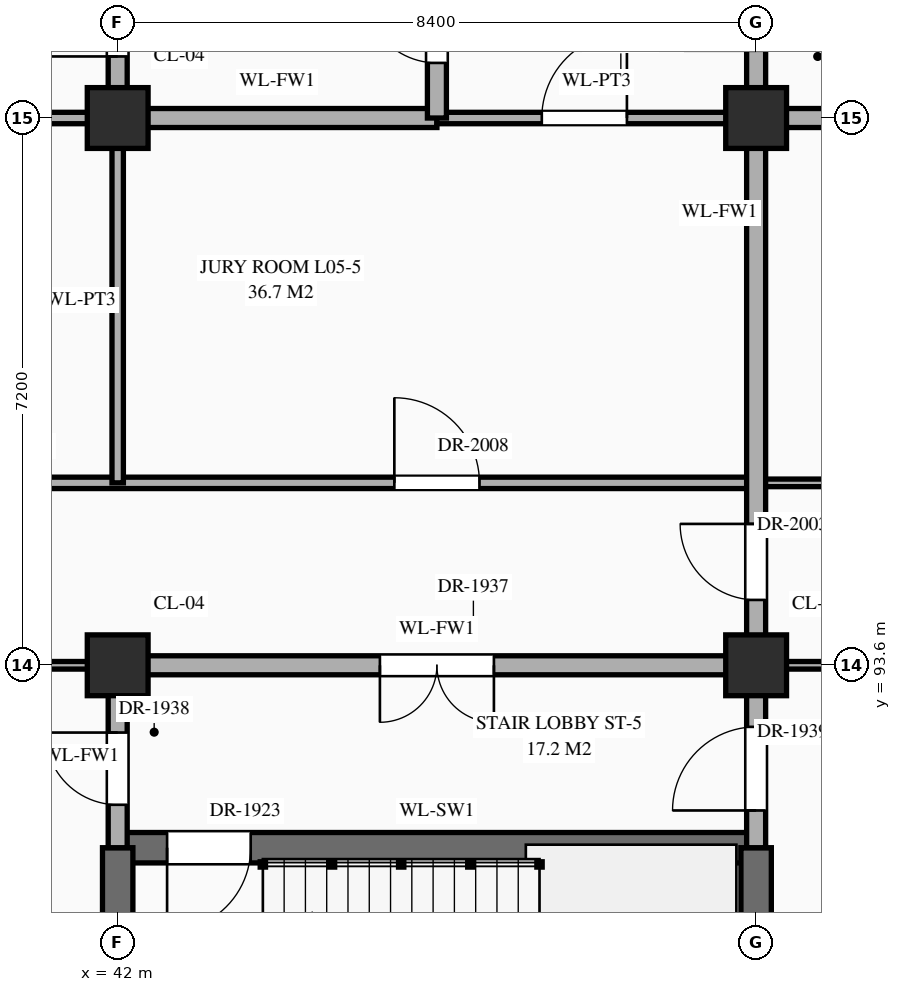
"""IFC4 building model, lengths in metres.
Left out: names, types, materials, properties, quantities, classifications, styles, units other than length and angle.
Written with IfcOpenShell. Run it as: python <this file> out.ifc"""

import sys

from ifc_helpers import new_model, si_unit, direction, frame, frame_2d, origin, origin_2d, place, context, subcontext, project, spatial, rectangle, extrude, element, fill, save


model = new_model("IFC4")
c1 = context("Model", 3, precision=1e-05, world=origin(), true_north=direction((0.0, 1.0)))
c2 = subcontext(c1, "Body", "Model", "MODEL_VIEW")
j1 = project(units=[si_unit("LENGTHUNIT", "METRE"), si_unit("PLANEANGLEUNIT", "RADIAN")], contexts=[c1])
p1 = place(None, origin())
s1 = spatial("IfcSite", under=j1, at=p1, CompositionType="ELEMENT")
p2 = place(p1, origin())
s2 = spatial("IfcBuilding", under=s1, at=p2, CompositionType="ELEMENT")
p3 = place(p2, frame((0.0, 0.0, 21.6)))
s3 = spatial("IfcBuildingStorey", under=s2, at=p3, CompositionType="ELEMENT", Elevation=21.6)
for number, where, z_axis, x_axis in (
    (1, (42.0, 93.6, 0.0), (0.0, 0.0, 1.0), (1.0, 0.0, 0.0)),
    (2, (42.0, 100.8, 0.0), (0.0, 0.0, 1.0), (1.0, 0.0, 0.0)),
    (3, (50.4, 93.6, 0.0), (0.0, 0.0, 1.0), (1.0, 0.0, 0.0)),
    (4, (50.4, 100.8, 0.0), (0.0, 0.0, 1.0), (1.0, 0.0, 0.0)),
):
    element("IfcColumn", number, at=place(p3, frame(where, z_axis=z_axis, x_axis=x_axis)), inside=s3, PredefinedType="COLUMN", context=c2, shape_type="SweptSolid", body=[
        extrude(rectangle(XDim=0.8, YDim=0.8, at=origin_2d()), origin(), (0.0, 0.0, 1.0), 4.5),
    ])
p4 = place(p3, frame((42.0, 91.2, 0.0), z_axis=(0.0, 0.0, 1.0), x_axis=(1.0, 0.0, 0.0)))
e5 = element("IfcWall", 5, at=p4, inside=s3, PredefinedType="SHEAR", context=c2, shape_type="SweptSolid", body=[
    extrude(rectangle(XDim=8.4, YDim=0.4, at=frame_2d((4.2, 0.0))), origin(), (0.0, 0.0, 1.0), 4.24),
])
p5 = place(p4, frame((0.65, 0.0, 0.0)))
e6 = element("IfcOpeningElement", 6, at=p5, cuts=e5, PredefinedType="OPENING", context=c2, shape_type="SweptSolid", body=[
    extrude(rectangle(XDim=1.1, YDim=2.2, at=frame_2d((0.55, 1.1))), frame((0.0, 0.212, 0.0), z_axis=(0.0, -1.0, 0.0), x_axis=(1.0, 0.0, 0.0)), (0.0, 0.0, 1.0), 0.424),
])
p6 = place(p3, frame((25.24, 93.6, 0.0), z_axis=(0.0, 0.0, 1.0), x_axis=(1.0, 0.0, 0.0)))
e7 = element("IfcWall", 7, at=p6, inside=s3, PredefinedType="STANDARD", context=c2, shape_type="SweptSolid", body=[
    extrude(rectangle(XDim=16.76, YDim=0.1, at=frame_2d((8.38, 0.0))), origin(), (0.0, 0.0, 1.0), 3.19),
])
p7 = place(p6, frame((0.94, 0.0, 0.0)))
e8 = element("IfcOpeningElement", 8, at=p7, cuts=e7, PredefinedType="OPENING", context=c2, shape_type="SweptSolid", body=[
    extrude(rectangle(XDim=1.16, YDim=2.3, at=frame_2d((0.58, 1.15))), frame((0.0, 0.062, 0.0), z_axis=(0.0, -1.0, 0.0), x_axis=(1.0, 0.0, 0.0)), (0.0, 0.0, 1.0), 0.124),
])
p8 = place(p6, frame((3.21, 0.0, 0.0)))
e9 = element("IfcOpeningElement", 9, at=p8, cuts=e7, PredefinedType="OPENING", context=c2, shape_type="SweptSolid", body=[
    extrude(rectangle(XDim=1.9, YDim=2.5, at=frame_2d((0.95, 1.25))), frame((0.0, 0.062, 0.0), z_axis=(0.0, -1.0, 0.0), x_axis=(1.0, 0.0, 0.0)), (0.0, 0.0, 1.0), 0.124),
])
p9 = place(p6, frame((6.34, 0.0, 0.0)))
e10 = element("IfcOpeningElement", 10, at=p9, cuts=e7, PredefinedType="OPENING", context=c2, shape_type="SweptSolid", body=[
    extrude(rectangle(XDim=1.24, YDim=2.3, at=frame_2d((0.62, 1.15))), frame((0.0, 0.062, 0.0), z_axis=(0.0, -1.0, 0.0), x_axis=(1.0, 0.0, 0.0)), (0.0, 0.0, 1.0), 0.124),
])
p10 = place(p6, frame((11.76, 0.0, 0.0)))
e11 = element("IfcOpeningElement", 11, at=p10, cuts=e7, PredefinedType="OPENING", context=c2, shape_type="SweptSolid", body=[
    extrude(rectangle(XDim=1.28, YDim=2.35, at=frame_2d((0.64, 1.175))), frame((0.0, 0.062, 0.0), z_axis=(0.0, -1.0, 0.0), x_axis=(1.0, 0.0, 0.0)), (0.0, 0.0, 1.0), 0.124),
])
p11 = place(p3, frame((42.0, 93.6, 0.0), z_axis=(0.0, 0.0, 1.0), x_axis=(1.0, 0.0, 0.0)))
e12 = element("IfcWall", 12, at=p11, inside=s3, PredefinedType="STANDARD", context=c2, shape_type="SweptSolid", body=[
    extrude(rectangle(XDim=8.4, YDim=0.25, at=frame_2d((4.2, 0.0))), origin(), (0.0, 0.0, 1.0), 3.39),
])
p12 = place(p11, frame((3.45, 0.0, 0.0)))
e13 = element("IfcOpeningElement", 13, at=p12, cuts=e12, PredefinedType="OPENING", context=c2, shape_type="SweptSolid", body=[
    extrude(rectangle(XDim=1.5, YDim=2.25, at=frame_2d((0.75, 1.125))), frame((0.0, 0.137, 0.0), z_axis=(0.0, -1.0, 0.0), x_axis=(1.0, 0.0, 0.0)), (0.0, 0.0, 1.0), 0.274),
])
p13 = place(p3, frame((50.4, 93.6, 0.0), z_axis=(0.0, 0.0, 1.0), x_axis=(1.0, 0.0, 0.0)))
e14 = element("IfcWall", 14, at=p13, inside=s3, PredefinedType="STANDARD", context=c2, shape_type="SweptSolid", body=[
    extrude(rectangle(XDim=8.4, YDim=0.1, at=frame_2d((4.2, 0.0))), origin(), (0.0, 0.0, 1.0), 3.39),
])
p14 = place(p13, frame((1.1, 0.0, 0.0)))
e15 = element("IfcOpeningElement", 15, at=p14, cuts=e14, PredefinedType="OPENING", context=c2, shape_type="SweptSolid", body=[
    extrude(rectangle(XDim=0.92, YDim=2.15, at=frame_2d((0.46, 1.075))), frame((0.0, 0.062, 0.0), z_axis=(0.0, -1.0, 0.0), x_axis=(1.0, 0.0, 0.0)), (0.0, 0.0, 1.0), 0.124),
])
p15 = place(p13, frame((3.72, 0.0, 0.0)))
e16 = element("IfcOpeningElement", 16, at=p15, cuts=e14, PredefinedType="OPENING", context=c2, shape_type="SweptSolid", body=[
    extrude(rectangle(XDim=0.96, YDim=2.2, at=frame_2d((0.48, 1.1))), frame((0.0, 0.062, 0.0), z_axis=(0.0, -1.0, 0.0), x_axis=(1.0, 0.0, 0.0)), (0.0, 0.0, 1.0), 0.124),
])
p16 = place(p13, frame((6.34, 0.0, 0.0)))
e17 = element("IfcOpeningElement", 17, at=p16, cuts=e14, PredefinedType="OPENING", context=c2, shape_type="SweptSolid", body=[
    extrude(rectangle(XDim=1.0, YDim=2.25, at=frame_2d((0.5, 1.125))), frame((0.0, 0.062, 0.0), z_axis=(0.0, -1.0, 0.0), x_axis=(1.0, 0.0, 0.0)), (0.0, 0.0, 1.0), 0.124),
])
p17 = place(p3, frame((31.0, 96.0, 0.0), z_axis=(0.0, 0.0, 1.0), x_axis=(1.0, 0.0, 0.0)))
e18 = element("IfcWall", 18, at=p17, inside=s3, PredefinedType="STANDARD", context=c2, shape_type="SweptSolid", body=[
    extrude(rectangle(XDim=19.4, YDim=0.15, at=frame_2d((9.7, 0.0))), origin(), (0.0, 0.0, 1.0), 4.24),
])
p18 = place(p17, frame((0.78, 0.0, 0.0)))
e19 = element("IfcOpeningElement", 19, at=p18, cuts=e18, PredefinedType="OPENING", context=c2, shape_type="SweptSolid", body=[
    extrude(rectangle(XDim=1.04, YDim=2.2, at=frame_2d((0.52, 1.1))), frame((0.0, 0.087, 0.0), z_axis=(0.0, -1.0, 0.0), x_axis=(1.0, 0.0, 0.0)), (0.0, 0.0, 1.0), 0.174),
])
p19 = place(p17, frame((6.26, 0.0, 0.0)))
e20 = element("IfcOpeningElement", 20, at=p19, cuts=e18, PredefinedType="OPENING", context=c2, shape_type="SweptSolid", body=[
    extrude(rectangle(XDim=1.08, YDim=2.25, at=frame_2d((0.54, 1.125))), frame((0.0, 0.087, 0.0), z_axis=(0.0, -1.0, 0.0), x_axis=(1.0, 0.0, 0.0)), (0.0, 0.0, 1.0), 0.174),
])
p20 = place(p17, frame((14.64, 0.0, 0.0)))
e21 = element("IfcOpeningElement", 21, at=p20, cuts=e18, PredefinedType="OPENING", context=c2, shape_type="SweptSolid", body=[
    extrude(rectangle(XDim=1.12, YDim=2.25, at=frame_2d((0.56, 1.125))), frame((0.0, 0.087, 0.0), z_axis=(0.0, -1.0, 0.0), x_axis=(1.0, 0.0, 0.0)), (0.0, 0.0, 1.0), 0.174),
])
p21 = place(p3, frame((50.4, 96.0, 0.0), z_axis=(0.0, 0.0, 1.0), x_axis=(1.0, 0.0, 0.0)))
e22 = element("IfcWall", 22, at=p21, inside=s3, PredefinedType="STANDARD", context=c2, shape_type="SweptSolid", body=[
    extrude(rectangle(XDim=5.8, YDim=0.1, at=frame_2d((2.9, 0.0))), origin(), (0.0, 0.0, 1.0), 4.24),
])
p22 = place(p21, frame((1.21, 0.0, 0.0)))
e23 = element("IfcOpeningElement", 23, at=p22, cuts=e22, PredefinedType="OPENING", context=c2, shape_type="SweptSolid", body=[
    extrude(rectangle(XDim=0.98, YDim=2.35, at=frame_2d((0.49, 1.175))), frame((0.0, 0.062, 0.0), z_axis=(0.0, -1.0, 0.0), x_axis=(1.0, 0.0, 0.0)), (0.0, 0.0, 1.0), 0.124),
])
p23 = place(p21, frame((4.09, 0.0, 0.0)))
e24 = element("IfcOpeningElement", 24, at=p23, cuts=e22, PredefinedType="OPENING", context=c2, shape_type="SweptSolid", body=[
    extrude(rectangle(XDim=1.02, YDim=2.4, at=frame_2d((0.51, 1.2))), frame((0.0, 0.062, 0.0), z_axis=(0.0, -1.0, 0.0), x_axis=(1.0, 0.0, 0.0)), (0.0, 0.0, 1.0), 0.124),
])
p24 = place(p3, frame((31.0, 100.8, 0.0), z_axis=(0.0, 0.0, 1.0), x_axis=(1.0, 0.0, 0.0)))
e25 = element("IfcWall", 25, at=p24, inside=s3, PredefinedType="STANDARD", context=c2, shape_type="SweptSolid", body=[
    extrude(rectangle(XDim=11.0, YDim=0.15, at=frame_2d((5.5, 0.0))), origin(), (0.0, 0.0, 1.0), 3.39),
])
p25 = place(p24, frame((0.6, 0.0, 0.0)))
e26 = element("IfcOpeningElement", 26, at=p25, cuts=e25, PredefinedType="OPENING", context=c2, shape_type="SweptSolid", body=[
    extrude(rectangle(XDim=1.08, YDim=2.25, at=frame_2d((0.54, 1.125))), frame((0.0, 0.087, 0.0), z_axis=(0.0, -1.0, 0.0), x_axis=(1.0, 0.0, 0.0)), (0.0, 0.0, 1.0), 0.174),
])
p26 = place(p24, frame((6.24, 0.0, 0.0)))
e27 = element("IfcOpeningElement", 27, at=p26, cuts=e25, PredefinedType="OPENING", context=c2, shape_type="SweptSolid", body=[
    extrude(rectangle(XDim=1.12, YDim=2.25, at=frame_2d((0.56, 1.125))), frame((0.0, 0.087, 0.0), z_axis=(0.0, -1.0, 0.0), x_axis=(1.0, 0.0, 0.0)), (0.0, 0.0, 1.0), 0.174),
])
p27 = place(p3, frame((42.0, 100.8, 0.0), z_axis=(0.0, 0.0, 1.0), x_axis=(1.0, 0.0, 0.0)))
e28 = element("IfcWall", 28, at=p27, inside=s3, PredefinedType="STANDARD", context=c2, shape_type="SweptSolid", body=[
    extrude(rectangle(XDim=4.2, YDim=0.25, at=frame_2d((2.1, 0.0))), origin(), (0.0, 0.0, 1.0), 3.39),
])
p28 = place(p3, frame((46.2, 100.8, 0.0), z_axis=(0.0, 0.0, 1.0), x_axis=(1.0, 0.0, 0.0)))
e29 = element("IfcWall", 29, at=p28, inside=s3, PredefinedType="STANDARD", context=c2, shape_type="SweptSolid", body=[
    extrude(rectangle(XDim=4.2, YDim=0.15, at=frame_2d((2.1, 0.0))), origin(), (0.0, 0.0, 1.0), 3.39),
])
p29 = place(p28, frame((1.38, 0.0, 0.0)))
e30 = element("IfcOpeningElement", 30, at=p29, cuts=e29, PredefinedType="OPENING", context=c2, shape_type="SweptSolid", body=[
    extrude(rectangle(XDim=1.12, YDim=2.25, at=frame_2d((0.56, 1.125))), frame((0.0, 0.087, 0.0), z_axis=(0.0, -1.0, 0.0), x_axis=(1.0, 0.0, 0.0)), (0.0, 0.0, 1.0), 0.174),
])
p30 = place(p3, frame((50.4, 100.8, 0.0), z_axis=(0.0, 0.0, 1.0), x_axis=(1.0, 0.0, 0.0)))
e31 = element("IfcWall", 31, at=p30, inside=s3, PredefinedType="STANDARD", context=c2, shape_type="SweptSolid", body=[
    extrude(rectangle(XDim=3.4, YDim=0.25, at=frame_2d((1.7, 0.0))), origin(), (0.0, 0.0, 1.0), 3.39),
])
p31 = place(p30, frame((1.31, 0.0, 0.0)))
e32 = element("IfcOpeningElement", 32, at=p31, cuts=e31, PredefinedType="OPENING", context=c2, shape_type="SweptSolid", body=[
    extrude(rectangle(XDim=1.1, YDim=2.2, at=frame_2d((0.55, 1.1))), frame((0.0, 0.137, 0.0), z_axis=(0.0, -1.0, 0.0), x_axis=(1.0, 0.0, 0.0)), (0.0, 0.0, 1.0), 0.274),
])
p32 = place(p3, frame((42.0, 86.4, 0.0), z_axis=(0.0, 0.0, 1.0), x_axis=(0.0, 1.0, 0.0)))
e33 = element("IfcWall", 33, at=p32, inside=s3, PredefinedType="SHEAR", context=c2, shape_type="SweptSolid", body=[
    extrude(rectangle(XDim=4.8, YDim=0.4, at=frame_2d((2.4, 0.0))), origin(), (0.0, 0.0, 1.0), 4.24),
])
p33 = place(p3, frame((42.0, 91.2, 0.0), z_axis=(0.0, 0.0, 1.0), x_axis=(0.0, 1.0, 0.0)))
e34 = element("IfcWall", 34, at=p33, inside=s3, PredefinedType="STANDARD", context=c2, shape_type="SweptSolid", body=[
    extrude(rectangle(XDim=2.4, YDim=0.25, at=frame_2d((1.2, 0.0))), origin(), (0.0, 0.0, 1.0), 3.49),
])
p34 = place(p33, frame((0.565, 0.0, 0.0)))
e35 = element("IfcOpeningElement", 35, at=p34, cuts=e34, PredefinedType="OPENING", context=c2, shape_type="SweptSolid", body=[
    extrude(rectangle(XDim=0.95, YDim=2.15, at=frame_2d((0.475, 1.075))), frame((0.0, 0.137, 0.0), z_axis=(0.0, -1.0, 0.0), x_axis=(1.0, 0.0, 0.0)), (0.0, 0.0, 1.0), 0.274),
])
p35 = place(p3, frame((42.0, 96.0, 0.0), z_axis=(0.0, 0.0, 1.0), x_axis=(0.0, 1.0, 0.0)))
e36 = element("IfcWall", 36, at=p35, inside=s3, PredefinedType="STANDARD", context=c2, shape_type="SweptSolid", body=[
    extrude(rectangle(XDim=4.8, YDim=0.15, at=frame_2d((2.4, 0.0))), origin(), (0.0, 0.0, 1.0), 3.49),
])
p36 = place(p3, frame((42.0, 100.8, 0.0), z_axis=(0.0, 0.0, 1.0), x_axis=(0.0, 1.0, 0.0)))
e37 = element("IfcWall", 37, at=p36, inside=s3, PredefinedType="STANDARD", context=c2, shape_type="SweptSolid", body=[
    extrude(rectangle(XDim=3.6, YDim=0.25, at=frame_2d((1.8, 0.0))), origin(), (0.0, 0.0, 1.0), 3.49),
])
p37 = place(p36, frame((0.81, 0.0, 0.0)))
e38 = element("IfcOpeningElement", 38, at=p37, cuts=e37, PredefinedType="OPENING", context=c2, shape_type="SweptSolid", body=[
    extrude(rectangle(XDim=1.1, YDim=2.2, at=frame_2d((0.55, 1.1))), frame((0.0, 0.137, 0.0), z_axis=(0.0, -1.0, 0.0), x_axis=(1.0, 0.0, 0.0)), (0.0, 0.0, 1.0), 0.274),
])
p38 = place(p3, frame((46.2, 100.8, 0.0), z_axis=(0.0, 0.0, 1.0), x_axis=(0.0, 1.0, 0.0)))
e39 = element("IfcWall", 39, at=p38, inside=s3, PredefinedType="STANDARD", context=c2, shape_type="SweptSolid", body=[
    extrude(rectangle(XDim=3.6, YDim=0.25, at=frame_2d((1.8, 0.0))), origin(), (0.0, 0.0, 1.0), 3.89),
])
p39 = place(p38, frame((0.725, 0.0, 0.0)))
e40 = element("IfcOpeningElement", 40, at=p39, cuts=e39, PredefinedType="OPENING", context=c2, shape_type="SweptSolid", body=[
    extrude(rectangle(XDim=0.95, YDim=2.15, at=frame_2d((0.475, 1.075))), frame((0.0, 0.137, 0.0), z_axis=(0.0, -1.0, 0.0), x_axis=(1.0, 0.0, 0.0)), (0.0, 0.0, 1.0), 0.274),
])
p40 = place(p3, frame((50.4, 86.4, 0.0), z_axis=(0.0, 0.0, 1.0), x_axis=(0.0, 1.0, 0.0)))
e41 = element("IfcWall", 41, at=p40, inside=s3, PredefinedType="SHEAR", context=c2, shape_type="SweptSolid", body=[
    extrude(rectangle(XDim=4.8, YDim=0.4, at=frame_2d((2.4, 0.0))), origin(), (0.0, 0.0, 1.0), 4.24),
])
p41 = place(p3, frame((50.4, 91.2, 0.0), z_axis=(0.0, 0.0, 1.0), x_axis=(0.0, 1.0, 0.0)))
e42 = element("IfcWall", 42, at=p41, inside=s3, PredefinedType="STANDARD", context=c2, shape_type="SweptSolid", body=[
    extrude(rectangle(XDim=13.2, YDim=0.25, at=frame_2d((6.6, 0.0))), origin(), (0.0, 0.0, 1.0), 3.49),
])
p42 = place(p41, frame((0.49, 0.0, 0.0)))
e43 = element("IfcOpeningElement", 43, at=p42, cuts=e42, PredefinedType="OPENING", context=c2, shape_type="SweptSolid", body=[
    extrude(rectangle(XDim=1.1, YDim=2.2, at=frame_2d((0.55, 1.1))), frame((0.0, 0.137, 0.0), z_axis=(0.0, -1.0, 0.0), x_axis=(1.0, 0.0, 0.0)), (0.0, 0.0, 1.0), 0.274),
])
p43 = place(p41, frame((10.485, 0.0, 0.0)))
e44 = element("IfcOpeningElement", 44, at=p43, cuts=e42, PredefinedType="OPENING", context=c2, shape_type="SweptSolid", body=[
    extrude(rectangle(XDim=0.95, YDim=2.15, at=frame_2d((0.475, 1.075))), frame((0.0, 0.137, 0.0), z_axis=(0.0, -1.0, 0.0), x_axis=(1.0, 0.0, 0.0)), (0.0, 0.0, 1.0), 0.274),
])
p44 = place(p41, frame((3.26, 0.0, 0.0)))
e45 = element("IfcOpeningElement", 45, at=p44, cuts=e42, PredefinedType="OPENING", context=c2, shape_type="SweptSolid", body=[
    extrude(rectangle(XDim=1.0, YDim=2.2, at=frame_2d((0.5, 1.1))), frame((0.0, 0.137, 0.0), z_axis=(0.0, -1.0, 0.0), x_axis=(1.0, 0.0, 0.0)), (0.0, 0.0, 1.0), 0.274),
])
p45 = place(p5, frame((1.1, 0.0, 0.0), z_axis=(0.0, 0.0, 1.0), x_axis=(-1.0, 0.0, 0.0)))
e46 = element("IfcDoor", 46, at=p45, inside=s3, OperationType="SINGLE_SWING_RIGHT", PredefinedType="DOOR", context=c2, shape_type="SweptSolid", body=[
    extrude(rectangle(XDim=1.1, YDim=2.2, at=frame_2d((0.55, 1.1))), frame((0.0, 0.025, 0.0), z_axis=(0.0, -1.0, 0.0), x_axis=(1.0, 0.0, 0.0)), (0.0, 0.0, 1.0), 0.05),
])
fill(e6, e46)
p46 = place(p12, frame((1.5, 0.0, 0.0), z_axis=(0.0, 0.0, 1.0), x_axis=(-1.0, 0.0, 0.0)))
e47 = element("IfcDoor", 47, at=p46, inside=s3, OperationType="DOUBLE_DOOR_SINGLE_SWING", PredefinedType="DOOR", context=c2, shape_type="SweptSolid", body=[
    extrude(rectangle(XDim=1.5, YDim=2.25, at=frame_2d((0.75, 1.125))), frame((0.0, 0.025, 0.0), z_axis=(0.0, -1.0, 0.0), x_axis=(1.0, 0.0, 0.0)), (0.0, 0.0, 1.0), 0.05),
])
fill(e13, e47)
p47 = place(p34, origin())
e48 = element("IfcDoor", 48, at=p47, inside=s3, OperationType="SINGLE_SWING_RIGHT", PredefinedType="DOOR", context=c2, shape_type="SweptSolid", body=[
    extrude(rectangle(XDim=0.95, YDim=2.15, at=frame_2d((0.475, 1.075))), frame((0.0, 0.025, 0.0), z_axis=(0.0, -1.0, 0.0), x_axis=(1.0, 0.0, 0.0)), (0.0, 0.0, 1.0), 0.05),
])
fill(e35, e48)
p48 = place(p42, origin())
e49 = element("IfcDoor", 49, at=p48, inside=s3, OperationType="SINGLE_SWING_LEFT", PredefinedType="DOOR", context=c2, shape_type="SweptSolid", body=[
    extrude(rectangle(XDim=1.1, YDim=2.2, at=frame_2d((0.55, 1.1))), frame((0.0, 0.025, 0.0), z_axis=(0.0, -1.0, 0.0), x_axis=(1.0, 0.0, 0.0)), (0.0, 0.0, 1.0), 0.05),
])
fill(e43, e49)
p49 = place(p39, origin())
e50 = element("IfcDoor", 50, at=p49, inside=s3, OperationType="SINGLE_SWING_RIGHT", PredefinedType="DOOR", context=c2, shape_type="SweptSolid", body=[
    extrude(rectangle(XDim=0.95, YDim=2.15, at=frame_2d((0.475, 1.075))), frame((0.0, 0.025, 0.0), z_axis=(0.0, -1.0, 0.0), x_axis=(1.0, 0.0, 0.0)), (0.0, 0.0, 1.0), 0.05),
])
fill(e40, e50)
p50 = place(p37, origin())
e51 = element("IfcDoor", 51, at=p50, inside=s3, OperationType="SINGLE_SWING_LEFT", PredefinedType="DOOR", context=c2, shape_type="SweptSolid", body=[
    extrude(rectangle(XDim=1.1, YDim=2.2, at=frame_2d((0.55, 1.1))), frame((0.0, 0.025, 0.0), z_axis=(0.0, -1.0, 0.0), x_axis=(1.0, 0.0, 0.0)), (0.0, 0.0, 1.0), 0.05),
])
fill(e38, e51)
p51 = place(p29, origin())
e52 = element("IfcDoor", 52, at=p51, inside=s3, OperationType="SINGLE_SWING_RIGHT", PredefinedType="DOOR", context=c2, shape_type="SweptSolid", body=[
    extrude(rectangle(XDim=1.12, YDim=2.25, at=frame_2d((0.56, 1.125))), frame((0.0, 0.025, 0.0), z_axis=(0.0, -1.0, 0.0), x_axis=(1.0, 0.0, 0.0)), (0.0, 0.0, 1.0), 0.05),
])
fill(e30, e52)
p52 = place(p44, origin())
e53 = element("IfcDoor", 53, at=p52, inside=s3, OperationType="SINGLE_SWING_RIGHT", PredefinedType="DOOR", context=c2, shape_type="SweptSolid", body=[
    extrude(rectangle(XDim=1.0, YDim=2.2, at=frame_2d((0.5, 1.1))), frame((0.0, 0.025, 0.0), z_axis=(0.0, -1.0, 0.0), x_axis=(1.0, 0.0, 0.0)), (0.0, 0.0, 1.0), 0.05),
])
fill(e45, e53)
p53 = place(p20, origin())
e54 = element("IfcDoor", 54, at=p53, inside=s3, OperationType="SINGLE_SWING_LEFT", PredefinedType="DOOR", context=c2, shape_type="SweptSolid", body=[
    extrude(rectangle(XDim=1.12, YDim=2.25, at=frame_2d((0.56, 1.125))), frame((0.0, 0.025, 0.0), z_axis=(0.0, -1.0, 0.0), x_axis=(1.0, 0.0, 0.0)), (0.0, 0.0, 1.0), 0.05),
])
fill(e21, e54)
save(model, sys.argv[1])
